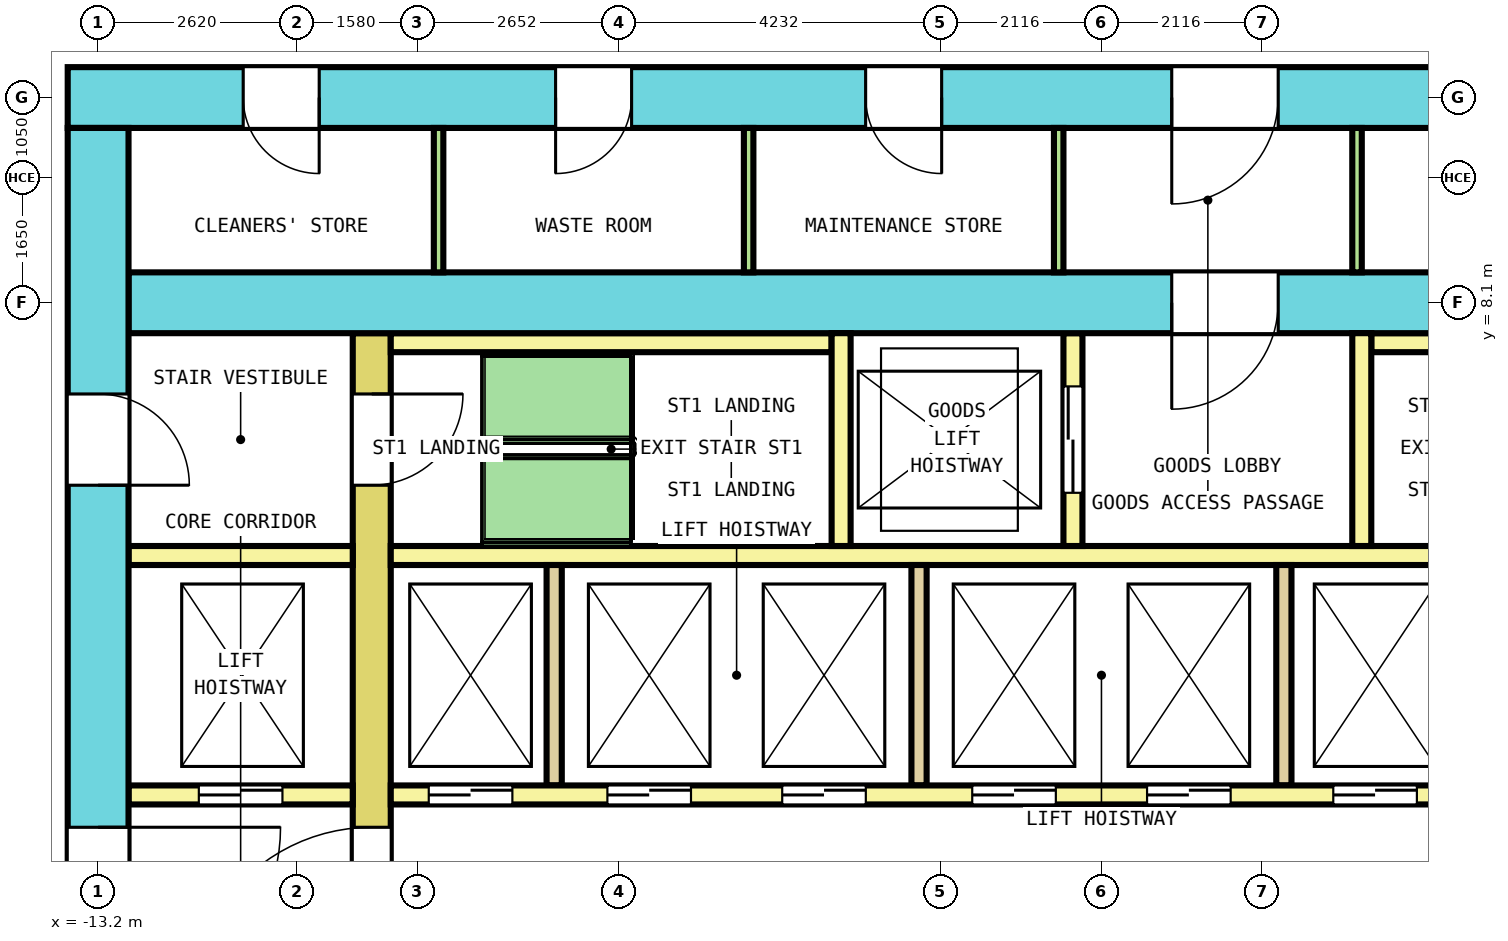
"""IFC4 building model, lengths in metres.
Left out: names, types, materials, properties, quantities, classifications, styles, units other than length and angle.
Written with IfcOpenShell. Run it as: python <this file> out.ifc"""

import sys

from ifc_helpers import new_model, si_unit, direction, frame, frame_2d, origin, place, context, subcontext, project, spatial, rectangle, extrude, element, fill, save


model = new_model("IFC4")
c1 = context("Model", 3, precision=1e-05, world=origin(), true_north=direction((0.0, 1.0)))
c2 = subcontext(c1, "Body", "Model", "MODEL_VIEW")
j1 = project(units=[si_unit("LENGTHUNIT", "METRE"), si_unit("PLANEANGLEUNIT", "RADIAN")], contexts=[c1])
p1 = place(None, origin())
s1 = spatial("IfcSite", under=j1, at=p1, CompositionType="ELEMENT")
p2 = place(p1, origin())
s2 = spatial("IfcBuilding", under=s1, at=p2, CompositionType="ELEMENT")
p3 = place(p2, frame((0.0, 0.0, 107.2)))
s3 = spatial("IfcBuildingStorey", under=s2, at=p3, CompositionType="ELEMENT", Elevation=107.2)
p4 = place(p3, frame((-13.6, 10.8, 0.0), z_axis=(0.0, 0.0, 1.0), x_axis=(1.0, 0.0, 0.0)))
e1 = element("IfcWall", 1, at=p4, inside=s3, PredefinedType="SHEAR", context=c2, shape_type="SweptSolid", body=[
    extrude(rectangle(XDim=27.2, YDim=0.8, at=frame_2d((13.6, 0.0))), origin(), (0.0, 0.0, 1.0), 5.7),
])
p5 = place(p4, frame((2.308, 0.0, 0.0)))
e2 = element("IfcOpeningElement", 2, at=p5, cuts=e1, PredefinedType="OPENING", context=c2, shape_type="SweptSolid", body=[
    extrude(rectangle(XDim=1.0, YDim=2.1, at=frame_2d((0.5, 1.05))), frame((0.0, 0.41, 0.0), z_axis=(0.0, -1.0, 0.0), x_axis=(1.0, 0.0, 0.0)), (0.0, 0.0, 1.0), 0.82),
])
p6 = place(p4, frame((6.419, 0.0, 0.0)))
e3 = element("IfcOpeningElement", 3, at=p6, cuts=e1, PredefinedType="OPENING", context=c2, shape_type="SweptSolid", body=[
    extrude(rectangle(XDim=1.0, YDim=2.1, at=frame_2d((0.5, 1.05))), frame((0.0, 0.41, 0.0), z_axis=(0.0, -1.0, 0.0), x_axis=(1.0, 0.0, 0.0)), (0.0, 0.0, 1.0), 0.82),
])
p7 = place(p4, frame((10.498, 0.0, 0.0)))
e4 = element("IfcOpeningElement", 4, at=p7, cuts=e1, PredefinedType="OPENING", context=c2, shape_type="SweptSolid", body=[
    extrude(rectangle(XDim=1.0, YDim=2.1, at=frame_2d((0.5, 1.05))), frame((0.0, 0.41, 0.0), z_axis=(0.0, -1.0, 0.0), x_axis=(1.0, 0.0, 0.0)), (0.0, 0.0, 1.0), 0.82),
])
p8 = place(p4, frame((18.822, 0.0, 0.0)))
e5 = element("IfcOpeningElement", 5, at=p8, cuts=e1, PredefinedType="OPENING", context=c2, shape_type="SweptSolid", body=[
    extrude(rectangle(XDim=1.0, YDim=2.1, at=frame_2d((0.5, 1.05))), frame((0.0, 0.41, 0.0), z_axis=(0.0, -1.0, 0.0), x_axis=(1.0, 0.0, 0.0)), (0.0, 0.0, 1.0), 0.82),
])
p9 = place(p4, frame((23.572, 0.0, 0.0)))
e6 = element("IfcOpeningElement", 6, at=p9, cuts=e1, PredefinedType="OPENING", context=c2, shape_type="SweptSolid", body=[
    extrude(rectangle(XDim=1.0, YDim=2.1, at=frame_2d((0.5, 1.05))), frame((0.0, 0.41, 0.0), z_axis=(0.0, -1.0, 0.0), x_axis=(1.0, 0.0, 0.0)), (0.0, 0.0, 1.0), 0.82),
])
p10 = place(p4, frame((14.525, 0.0, 0.0)))
e7 = element("IfcOpeningElement", 7, at=p10, cuts=e1, PredefinedType="OPENING", context=c2, shape_type="SweptSolid", body=[
    extrude(rectangle(XDim=1.4, YDim=2.1, at=frame_2d((0.7, 1.05))), frame((0.0, 0.41, 0.0), z_axis=(0.0, -1.0, 0.0), x_axis=(1.0, 0.0, 0.0)), (0.0, 0.0, 1.0), 0.82),
])
p11 = place(p3, frame((-13.2, -10.4, 0.0), z_axis=(0.0, 0.0, 1.0), x_axis=(0.0, 1.0, 0.0)))
e8 = element("IfcWall", 8, at=p11, inside=s3, PredefinedType="SHEAR", context=c2, shape_type="SweptSolid", body=[
    extrude(rectangle(XDim=20.8, YDim=0.8, at=frame_2d((10.4, 0.0))), origin(), (0.0, 0.0, 1.0), 5.7),
])
p12 = place(p11, frame((9.2, 0.0, 0.0)))
e9 = element("IfcOpeningElement", 9, at=p12, cuts=e8, PredefinedType="OPENING", context=c2, shape_type="SweptSolid", body=[
    extrude(rectangle(XDim=2.4, YDim=2.1, at=frame_2d((1.2, 1.05))), frame((0.0, 0.41, 0.0), z_axis=(0.0, -1.0, 0.0), x_axis=(1.0, 0.0, 0.0)), (0.0, 0.0, 1.0), 0.82),
])
p13 = place(p11, frame((16.1, 0.0, 0.0)))
e10 = element("IfcOpeningElement", 10, at=p13, cuts=e8, PredefinedType="OPENING", context=c2, shape_type="SweptSolid", body=[
    extrude(rectangle(XDim=1.2, YDim=2.1, at=frame_2d((0.6, 1.05))), frame((0.0, 0.41, 0.0), z_axis=(0.0, -1.0, 0.0), x_axis=(1.0, 0.0, 0.0)), (0.0, 0.0, 1.0), 0.82),
])
p14 = place(p11, frame((3.5, 0.0, 0.0)))
e11 = element("IfcOpeningElement", 11, at=p14, cuts=e8, PredefinedType="OPENING", context=c2, shape_type="SweptSolid", body=[
    extrude(rectangle(XDim=1.2, YDim=2.1, at=frame_2d((0.6, 1.05))), frame((0.0, 0.41, 0.0), z_axis=(0.0, -1.0, 0.0), x_axis=(1.0, 0.0, 0.0)), (0.0, 0.0, 1.0), 0.82),
])
p15 = place(p3, frame((-12.8, 8.1, 0.0), z_axis=(0.0, 0.0, 1.0), x_axis=(1.0, 0.0, 0.0)))
e12 = element("IfcWall", 12, at=p15, inside=s3, PredefinedType="SHEAR", context=c2, shape_type="SweptSolid", body=[
    extrude(rectangle(XDim=25.6, YDim=0.8, at=frame_2d((12.8, 0.0))), origin(), (0.0, 0.0, 1.0), 5.7),
])
p16 = place(p15, frame((13.725, 0.0, 0.0)))
e13 = element("IfcOpeningElement", 13, at=p16, cuts=e12, PredefinedType="OPENING", context=c2, shape_type="SweptSolid", body=[
    extrude(rectangle(XDim=1.4, YDim=2.1, at=frame_2d((0.7, 1.05))), frame((0.0, 0.41, 0.0), z_axis=(0.0, -1.0, 0.0), x_axis=(1.0, 0.0, 0.0)), (0.0, 0.0, 1.0), 0.82),
])
p17 = place(p3, frame((-9.6, -7.7, 0.0), z_axis=(0.0, 0.0, 1.0), x_axis=(0.0, 1.0, 0.0)))
e14 = element("IfcWall", 14, at=p17, inside=s3, PredefinedType="SHEAR", context=c2, shape_type="SweptSolid", body=[
    extrude(rectangle(XDim=15.4, YDim=0.5, at=frame_2d((7.7, 0.0))), origin(), (0.0, 0.0, 1.0), 5.7),
])
p18 = place(p17, frame((6.5, 0.0, 0.0)))
e15 = element("IfcOpeningElement", 15, at=p18, cuts=e14, PredefinedType="OPENING", context=c2, shape_type="SweptSolid", body=[
    extrude(rectangle(XDim=2.4, YDim=2.1, at=frame_2d((1.2, 1.05))), frame((0.0, 0.26, 0.0), z_axis=(0.0, -1.0, 0.0), x_axis=(1.0, 0.0, 0.0)), (0.0, 0.0, 1.0), 0.52),
])
p19 = place(p17, frame((13.4, 0.0, 0.0)))
e16 = element("IfcOpeningElement", 16, at=p19, cuts=e14, PredefinedType="OPENING", context=c2, shape_type="SweptSolid", body=[
    extrude(rectangle(XDim=1.2, YDim=2.1, at=frame_2d((0.6, 1.05))), frame((0.0, 0.26, 0.0), z_axis=(0.0, -1.0, 0.0), x_axis=(1.0, 0.0, 0.0)), (0.0, 0.0, 1.0), 0.52),
])
p20 = place(p17, frame((0.8, 0.0, 0.0)))
e17 = element("IfcOpeningElement", 17, at=p20, cuts=e14, PredefinedType="OPENING", context=c2, shape_type="SweptSolid", body=[
    extrude(rectangle(XDim=1.2, YDim=2.1, at=frame_2d((0.6, 1.05))), frame((0.0, 0.26, 0.0), z_axis=(0.0, -1.0, 0.0), x_axis=(1.0, 0.0, 0.0)), (0.0, 0.0, 1.0), 0.52),
])
p21 = place(p3, frame((-12.8, 1.625, 0.0), z_axis=(0.0, 0.0, 1.0), x_axis=(1.0, 0.0, 0.0)))
e18 = element("IfcWall", 18, at=p21, inside=s3, PredefinedType="SOLIDWALL", context=c2, shape_type="SweptSolid", body=[
    extrude(rectangle(XDim=2.95, YDim=0.25, at=frame_2d((1.475, 0.0))), origin(), (0.0, 0.0, 1.0), 5.7),
])
p22 = place(p21, frame((0.925, 0.0, 0.0)))
e19 = element("IfcOpeningElement", 19, at=p22, cuts=e18, PredefinedType="OPENING", context=c2, shape_type="SweptSolid", body=[
    extrude(rectangle(XDim=1.1, YDim=2.1, at=frame_2d((0.55, 1.05))), frame((0.0, 0.135, 0.0), z_axis=(0.0, -1.0, 0.0), x_axis=(1.0, 0.0, 0.0)), (0.0, 0.0, 1.0), 0.27),
])
p23 = place(p3, frame((-9.35, 1.625, 0.0), z_axis=(0.0, 0.0, 1.0), x_axis=(1.0, 0.0, 0.0)))
e20 = element("IfcWall", 20, at=p23, inside=s3, PredefinedType="SOLIDWALL", context=c2, shape_type="SweptSolid", body=[
    extrude(rectangle(XDim=18.7, YDim=0.25, at=frame_2d((9.35, 0.0))), origin(), (0.0, 0.0, 1.0), 5.7),
])
p24 = place(p23, frame((0.5, 0.0, 0.0)))
e21 = element("IfcOpeningElement", 21, at=p24, cuts=e20, PredefinedType="OPENING", context=c2, shape_type="SweptSolid", body=[
    extrude(rectangle(XDim=1.1, YDim=2.1, at=frame_2d((0.55, 1.05))), frame((0.0, 0.135, 0.0), z_axis=(0.0, -1.0, 0.0), x_axis=(1.0, 0.0, 0.0)), (0.0, 0.0, 1.0), 0.27),
])
p25 = place(p23, frame((2.85, 0.0, 0.0)))
e22 = element("IfcOpeningElement", 22, at=p25, cuts=e20, PredefinedType="OPENING", context=c2, shape_type="SweptSolid", body=[
    extrude(rectangle(XDim=1.1, YDim=2.1, at=frame_2d((0.55, 1.05))), frame((0.0, 0.135, 0.0), z_axis=(0.0, -1.0, 0.0), x_axis=(1.0, 0.0, 0.0)), (0.0, 0.0, 1.0), 0.27),
])
p26 = place(p23, frame((5.15, 0.0, 0.0)))
e23 = element("IfcOpeningElement", 23, at=p26, cuts=e20, PredefinedType="OPENING", context=c2, shape_type="SweptSolid", body=[
    extrude(rectangle(XDim=1.1, YDim=2.1, at=frame_2d((0.55, 1.05))), frame((0.0, 0.135, 0.0), z_axis=(0.0, -1.0, 0.0), x_axis=(1.0, 0.0, 0.0)), (0.0, 0.0, 1.0), 0.27),
])
p27 = place(p23, frame((7.65, 0.0, 0.0)))
e24 = element("IfcOpeningElement", 24, at=p27, cuts=e20, PredefinedType="OPENING", context=c2, shape_type="SweptSolid", body=[
    extrude(rectangle(XDim=1.1, YDim=2.1, at=frame_2d((0.55, 1.05))), frame((0.0, 0.135, 0.0), z_axis=(0.0, -1.0, 0.0), x_axis=(1.0, 0.0, 0.0)), (0.0, 0.0, 1.0), 0.27),
])
p28 = place(p23, frame((9.95, 0.0, 0.0)))
e25 = element("IfcOpeningElement", 25, at=p28, cuts=e20, PredefinedType="OPENING", context=c2, shape_type="SweptSolid", body=[
    extrude(rectangle(XDim=1.1, YDim=2.1, at=frame_2d((0.55, 1.05))), frame((0.0, 0.135, 0.0), z_axis=(0.0, -1.0, 0.0), x_axis=(1.0, 0.0, 0.0)), (0.0, 0.0, 1.0), 0.27),
])
p29 = place(p23, frame((12.4, 0.0, 0.0)))
e26 = element("IfcOpeningElement", 26, at=p29, cuts=e20, PredefinedType="OPENING", context=c2, shape_type="SweptSolid", body=[
    extrude(rectangle(XDim=1.1, YDim=2.1, at=frame_2d((0.55, 1.05))), frame((0.0, 0.135, 0.0), z_axis=(0.0, -1.0, 0.0), x_axis=(1.0, 0.0, 0.0)), (0.0, 0.0, 1.0), 0.27),
])
p30 = place(p23, frame((14.8, 0.0, 0.0)))
e27 = element("IfcOpeningElement", 27, at=p30, cuts=e20, PredefinedType="OPENING", context=c2, shape_type="SweptSolid", body=[
    extrude(rectangle(XDim=1.1, YDim=2.1, at=frame_2d((0.55, 1.05))), frame((0.0, 0.135, 0.0), z_axis=(0.0, -1.0, 0.0), x_axis=(1.0, 0.0, 0.0)), (0.0, 0.0, 1.0), 0.27),
])
p31 = place(p23, frame((17.1, 0.0, 0.0)))
e28 = element("IfcOpeningElement", 28, at=p31, cuts=e20, PredefinedType="OPENING", context=c2, shape_type="SweptSolid", body=[
    extrude(rectangle(XDim=1.1, YDim=2.1, at=frame_2d((0.55, 1.05))), frame((0.0, 0.135, 0.0), z_axis=(0.0, -1.0, 0.0), x_axis=(1.0, 0.0, 0.0)), (0.0, 0.0, 1.0), 0.27),
])
p32 = place(p3, frame((-12.8, 4.775, 0.0), z_axis=(0.0, 0.0, 1.0), x_axis=(1.0, 0.0, 0.0)))
e29 = element("IfcWall", 29, at=p32, inside=s3, PredefinedType="SOLIDWALL", context=c2, shape_type="SweptSolid", body=[
    extrude(rectangle(XDim=2.95, YDim=0.25, at=frame_2d((1.475, 0.0))), origin(), (0.0, 0.0, 1.0), 5.7),
])
p33 = place(p3, frame((-9.35, 4.775, 0.0), z_axis=(0.0, 0.0, 1.0), x_axis=(1.0, 0.0, 0.0)))
e30 = element("IfcWall", 30, at=p33, inside=s3, PredefinedType="SOLIDWALL", context=c2, shape_type="SweptSolid", body=[
    extrude(rectangle(XDim=18.7, YDim=0.25, at=frame_2d((9.35, 0.0))), origin(), (0.0, 0.0, 1.0), 5.7),
])
for number, where, z_axis, x_axis in (
    (31, (-7.2, 1.75, 0.0), (0.0, 0.0, 1.0), (0.0, 1.0, 0.0)),
    (32, (-2.4, 1.75, 0.0), (0.0, 0.0, 1.0), (0.0, 1.0, 0.0)),
    (33, (2.4, 1.75, 0.0), (0.0, 0.0, 1.0), (0.0, 1.0, 0.0)),
):
    element("IfcWall", number, at=place(p3, frame(where, z_axis=z_axis, x_axis=x_axis)), inside=s3, PredefinedType="SOLIDWALL", context=c2, shape_type="SweptSolid", body=[
        extrude(rectangle(XDim=2.9, YDim=0.2, at=frame_2d((1.45, 0.0))), origin(), (0.0, 0.0, 1.0), 5.7),
    ])
for number, where, z_axis, x_axis in (
    (34, (-9.35, 7.575, 0.0), (0.0, 0.0, 1.0), (1.0, 0.0, 0.0)),
    (35, (3.55, 7.575, 0.0), (0.0, 0.0, 1.0), (1.0, 0.0, 0.0)),
):
    element("IfcWall", number, at=place(p3, frame(where, z_axis=z_axis, x_axis=x_axis)), inside=s3, PredefinedType="SOLIDWALL", context=c2, shape_type="SweptSolid", body=[
        extrude(rectangle(XDim=5.8, YDim=0.25, at=frame_2d((2.9, 0.0))), origin(), (0.0, 0.0, 1.0), 5.7),
    ])
p34 = place(p3, frame((-3.425, 4.9, 0.0), z_axis=(0.0, 0.0, 1.0), x_axis=(0.0, 1.0, 0.0)))
e36 = element("IfcWall", 36, at=p34, inside=s3, PredefinedType="SOLIDWALL", context=c2, shape_type="SweptSolid", body=[
    extrude(rectangle(XDim=2.8, YDim=0.25, at=frame_2d((1.4, 0.0))), origin(), (0.0, 0.0, 1.0), 5.7),
])
p35 = place(p3, frame((-0.375, 4.9, 0.0), z_axis=(0.0, 0.0, 1.0), x_axis=(0.0, 1.0, 0.0)))
e37 = element("IfcWall", 37, at=p35, inside=s3, PredefinedType="SOLIDWALL", context=c2, shape_type="SweptSolid", body=[
    extrude(rectangle(XDim=2.8, YDim=0.25, at=frame_2d((1.4, 0.0))), origin(), (0.0, 0.0, 1.0), 5.7),
])
p36 = place(p35, frame((0.7, 0.0, 0.0)))
e38 = element("IfcOpeningElement", 38, at=p36, cuts=e37, PredefinedType="OPENING", context=c2, shape_type="SweptSolid", body=[
    extrude(rectangle(XDim=1.4, YDim=2.1, at=frame_2d((0.7, 1.05))), frame((0.0, 0.135, 0.0), z_axis=(0.0, -1.0, 0.0), x_axis=(1.0, 0.0, 0.0)), (0.0, 0.0, 1.0), 0.27),
])
p37 = place(p3, frame((3.425, 4.9, 0.0), z_axis=(0.0, 0.0, 1.0), x_axis=(0.0, 1.0, 0.0)))
e39 = element("IfcWall", 39, at=p37, inside=s3, PredefinedType="SOLIDWALL", context=c2, shape_type="SweptSolid", body=[
    extrude(rectangle(XDim=2.8, YDim=0.25, at=frame_2d((1.4, 0.0))), origin(), (0.0, 0.0, 1.0), 5.7),
])
for number, where, z_axis, x_axis in (
    (40, (-8.721, 8.5, 0.0), (0.0, 0.0, 1.0), (0.0, 1.0, 0.0)),
    (41, (-4.642, 8.5, 0.0), (0.0, 0.0, 1.0), (0.0, 1.0, 0.0)),
    (42, (-0.562, 8.5, 0.0), (0.0, 0.0, 1.0), (0.0, 1.0, 0.0)),
    (43, (3.363, 8.5, 0.0), (0.0, 0.0, 1.0), (0.0, 1.0, 0.0)),
):
    element("IfcWall", number, at=place(p3, frame(where, z_axis=z_axis, x_axis=x_axis)), inside=s3, PredefinedType="PARTITIONING", context=c2, shape_type="SweptSolid", body=[
        extrude(rectangle(XDim=1.9, YDim=0.125, at=frame_2d((0.95, 0.0))), origin(), (0.0, 0.0, 1.0), 5.7),
    ])
p38 = place(p22, origin())
e44 = element("IfcDoor", 44, at=p38, inside=s3, OperationType="DOUBLE_DOOR_SLIDING", PredefinedType="DOOR", context=c2, shape_type="SweptSolid", body=[
    extrude(rectangle(XDim=1.1, YDim=2.1, at=frame_2d((0.55, 1.05))), frame((0.0, 0.075, 0.0), z_axis=(0.0, -1.0, 0.0), x_axis=(1.0, 0.0, 0.0)), (0.0, 0.0, 1.0), 0.15),
])
fill(e19, e44)
p39 = place(p24, origin())
e45 = element("IfcDoor", 45, at=p39, inside=s3, OperationType="DOUBLE_DOOR_SLIDING", PredefinedType="DOOR", context=c2, shape_type="SweptSolid", body=[
    extrude(rectangle(XDim=1.1, YDim=2.1, at=frame_2d((0.55, 1.05))), frame((0.0, 0.075, 0.0), z_axis=(0.0, -1.0, 0.0), x_axis=(1.0, 0.0, 0.0)), (0.0, 0.0, 1.0), 0.15),
])
fill(e21, e45)
p40 = place(p25, origin())
e46 = element("IfcDoor", 46, at=p40, inside=s3, OperationType="DOUBLE_DOOR_SLIDING", PredefinedType="DOOR", context=c2, shape_type="SweptSolid", body=[
    extrude(rectangle(XDim=1.1, YDim=2.1, at=frame_2d((0.55, 1.05))), frame((0.0, 0.075, 0.0), z_axis=(0.0, -1.0, 0.0), x_axis=(1.0, 0.0, 0.0)), (0.0, 0.0, 1.0), 0.15),
])
fill(e22, e46)
p41 = place(p26, origin())
e47 = element("IfcDoor", 47, at=p41, inside=s3, OperationType="DOUBLE_DOOR_SLIDING", PredefinedType="DOOR", context=c2, shape_type="SweptSolid", body=[
    extrude(rectangle(XDim=1.1, YDim=2.1, at=frame_2d((0.55, 1.05))), frame((0.0, 0.075, 0.0), z_axis=(0.0, -1.0, 0.0), x_axis=(1.0, 0.0, 0.0)), (0.0, 0.0, 1.0), 0.15),
])
fill(e23, e47)
p42 = place(p27, origin())
e48 = element("IfcDoor", 48, at=p42, inside=s3, OperationType="DOUBLE_DOOR_SLIDING", PredefinedType="DOOR", context=c2, shape_type="SweptSolid", body=[
    extrude(rectangle(XDim=1.1, YDim=2.1, at=frame_2d((0.55, 1.05))), frame((0.0, 0.075, 0.0), z_axis=(0.0, -1.0, 0.0), x_axis=(1.0, 0.0, 0.0)), (0.0, 0.0, 1.0), 0.15),
])
fill(e24, e48)
p43 = place(p28, origin())
e49 = element("IfcDoor", 49, at=p43, inside=s3, OperationType="DOUBLE_DOOR_SLIDING", PredefinedType="DOOR", context=c2, shape_type="SweptSolid", body=[
    extrude(rectangle(XDim=1.1, YDim=2.1, at=frame_2d((0.55, 1.05))), frame((0.0, 0.075, 0.0), z_axis=(0.0, -1.0, 0.0), x_axis=(1.0, 0.0, 0.0)), (0.0, 0.0, 1.0), 0.15),
])
fill(e25, e49)
p44 = place(p29, origin())
e50 = element("IfcDoor", 50, at=p44, inside=s3, OperationType="DOUBLE_DOOR_SLIDING", PredefinedType="DOOR", context=c2, shape_type="SweptSolid", body=[
    extrude(rectangle(XDim=1.1, YDim=2.1, at=frame_2d((0.55, 1.05))), frame((0.0, 0.075, 0.0), z_axis=(0.0, -1.0, 0.0), x_axis=(1.0, 0.0, 0.0)), (0.0, 0.0, 1.0), 0.15),
])
fill(e26, e50)
p45 = place(p36, origin())
e51 = element("IfcDoor", 51, at=p45, inside=s3, OperationType="DOUBLE_DOOR_SLIDING", PredefinedType="DOOR", context=c2, shape_type="SweptSolid", body=[
    extrude(rectangle(XDim=1.4, YDim=2.1, at=frame_2d((0.7, 1.05))), frame((0.0, 0.075, 0.0), z_axis=(0.0, -1.0, 0.0), x_axis=(1.0, 0.0, 0.0)), (0.0, 0.0, 1.0), 0.15),
])
fill(e38, e51)
p46 = place(p18, origin())
e52 = element("IfcDoor", 52, at=p46, inside=s3, OperationType="DOUBLE_DOOR_SINGLE_SWING", PredefinedType="DOOR", context=c2, shape_type="SweptSolid", body=[
    extrude(rectangle(XDim=2.4, YDim=2.1, at=frame_2d((1.2, 1.05))), frame((0.0, 0.2, 0.0), z_axis=(0.0, -1.0, 0.0), x_axis=(1.0, 0.0, 0.0)), (0.0, 0.0, 1.0), 0.4),
])
fill(e15, e52)
p47 = place(p12, origin())
e53 = element("IfcDoor", 53, at=p47, inside=s3, OperationType="DOUBLE_DOOR_SINGLE_SWING", PredefinedType="DOOR", context=c2, shape_type="SweptSolid", body=[
    extrude(rectangle(XDim=2.4, YDim=2.1, at=frame_2d((1.2, 1.05))), frame((0.0, 0.3, 0.0), z_axis=(0.0, -1.0, 0.0), x_axis=(1.0, 0.0, 0.0)), (0.0, 0.0, 1.0), 0.6),
])
fill(e9, e53)
p48 = place(p19, origin())
e54 = element("IfcDoor", 54, at=p48, inside=s3, OperationType="SINGLE_SWING_RIGHT", PredefinedType="DOOR", context=c2, shape_type="SweptSolid", body=[
    extrude(rectangle(XDim=1.2, YDim=2.1, at=frame_2d((0.6, 1.05))), frame((0.0, 0.2, 0.0), z_axis=(0.0, -1.0, 0.0), x_axis=(1.0, 0.0, 0.0)), (0.0, 0.0, 1.0), 0.4),
])
fill(e16, e54)
p49 = place(p13, origin())
e55 = element("IfcDoor", 55, at=p49, inside=s3, OperationType="SINGLE_SWING_LEFT", PredefinedType="DOOR", context=c2, shape_type="SweptSolid", body=[
    extrude(rectangle(XDim=1.2, YDim=2.1, at=frame_2d((0.6, 1.05))), frame((0.0, 0.3, 0.0), z_axis=(0.0, -1.0, 0.0), x_axis=(1.0, 0.0, 0.0)), (0.0, 0.0, 1.0), 0.6),
])
fill(e10, e55)
p50 = place(p16, origin())
e56 = element("IfcDoor", 56, at=p50, inside=s3, OperationType="DOUBLE_DOOR_SINGLE_SWING", PredefinedType="DOOR", context=c2, shape_type="SweptSolid", body=[
    extrude(rectangle(XDim=1.4, YDim=2.1, at=frame_2d((0.7, 1.05))), frame((0.0, 0.3, 0.0), z_axis=(0.0, -1.0, 0.0), x_axis=(1.0, 0.0, 0.0)), (0.0, 0.0, 1.0), 0.6),
])
fill(e13, e56)
p51 = place(p5, origin())
e57 = element("IfcDoor", 57, at=p51, inside=s3, OperationType="SINGLE_SWING_LEFT", PredefinedType="DOOR", context=c2, shape_type="SweptSolid", body=[
    extrude(rectangle(XDim=1.0, YDim=2.1, at=frame_2d((0.5, 1.05))), frame((0.0, 0.3, 0.0), z_axis=(0.0, -1.0, 0.0), x_axis=(1.0, 0.0, 0.0)), (0.0, 0.0, 1.0), 0.6),
])
fill(e2, e57)
p52 = place(p6, origin())
e58 = element("IfcDoor", 58, at=p52, inside=s3, OperationType="SINGLE_SWING_RIGHT", PredefinedType="DOOR", context=c2, shape_type="SweptSolid", body=[
    extrude(rectangle(XDim=1.0, YDim=2.1, at=frame_2d((0.5, 1.05))), frame((0.0, 0.3, 0.0), z_axis=(0.0, -1.0, 0.0), x_axis=(1.0, 0.0, 0.0)), (0.0, 0.0, 1.0), 0.6),
])
fill(e3, e58)
p53 = place(p7, origin())
e59 = element("IfcDoor", 59, at=p53, inside=s3, OperationType="SINGLE_SWING_LEFT", PredefinedType="DOOR", context=c2, shape_type="SweptSolid", body=[
    extrude(rectangle(XDim=1.0, YDim=2.1, at=frame_2d((0.5, 1.05))), frame((0.0, 0.3, 0.0), z_axis=(0.0, -1.0, 0.0), x_axis=(1.0, 0.0, 0.0)), (0.0, 0.0, 1.0), 0.6),
])
fill(e4, e59)
p54 = place(p10, origin())
e60 = element("IfcDoor", 60, at=p54, inside=s3, OperationType="DOUBLE_DOOR_SINGLE_SWING", PredefinedType="DOOR", context=c2, shape_type="SweptSolid", body=[
    extrude(rectangle(XDim=1.4, YDim=2.1, at=frame_2d((0.7, 1.05))), frame((0.0, 0.3, 0.0), z_axis=(0.0, -1.0, 0.0), x_axis=(1.0, 0.0, 0.0)), (0.0, 0.0, 1.0), 0.6),
])
fill(e7, e60)
save(model, sys.argv[1])
